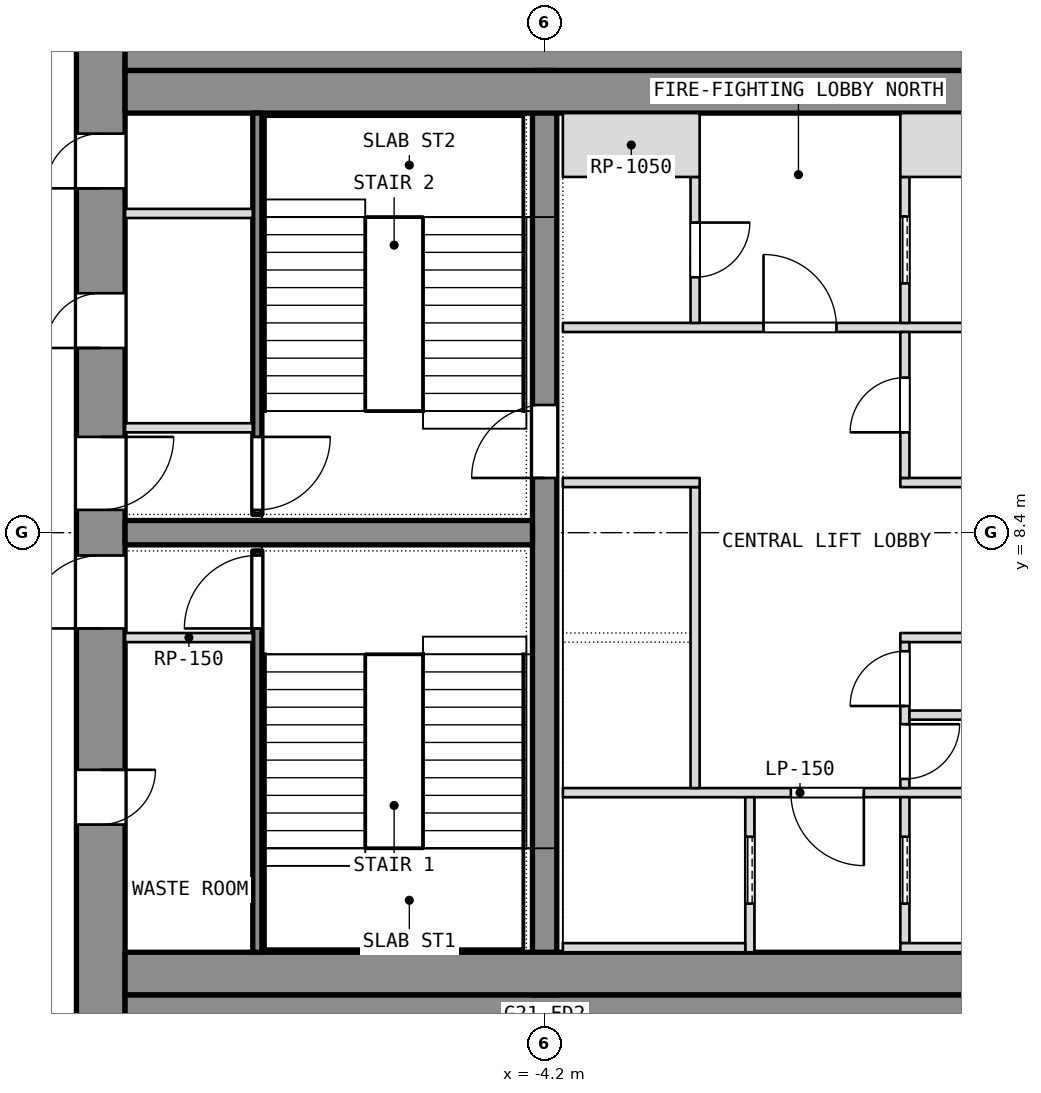
"""IFC4 building model, lengths in metres.
Left out: names, types, materials, properties, quantities, classifications, styles, units other than length and angle.
Written with IfcOpenShell. Run it as: python <this file> out.ifc"""

import sys

from ifc_helpers import new_model, si_unit, direction, frame, frame_2d, origin, place, context, subcontext, project, spatial, rectangle, extrude, element, fill, save


model = new_model("IFC4")
c1 = context("Model", 3, precision=1e-05, world=origin(), true_north=direction((0.0, 1.0)))
c2 = subcontext(c1, "Body", "Model", "MODEL_VIEW")
j1 = project(units=[si_unit("LENGTHUNIT", "METRE"), si_unit("PLANEANGLEUNIT", "RADIAN")], contexts=[c1])
p1 = place(None, origin())
s1 = spatial("IfcSite", under=j1, at=p1, CompositionType="ELEMENT")
p2 = place(p1, origin())
s2 = spatial("IfcBuilding", under=s1, at=p2, CompositionType="ELEMENT")
p3 = place(p2, frame((0.0, 0.0, 245.3)))
s3 = spatial("IfcBuildingStorey", under=s2, at=p3, CompositionType="ELEMENT", Elevation=245.3)
p4 = place(p3, frame((-11.5, 0.0, 0.0), z_axis=(0.0, 0.0, 1.0), x_axis=(0.0, 1.0, 0.0)))
e1 = element("IfcWall", 1, at=p4, inside=s3, PredefinedType="SHEAR", context=c2, shape_type="SweptSolid", body=[
    extrude(rectangle(XDim=16.8, YDim=0.8, at=frame_2d((8.4, 0.0))), origin(), (0.0, 0.0, 1.0), 3.6),
])
p5 = place(p4, frame((3.6, 0.0, 0.0)))
e2 = element("IfcOpeningElement", 2, at=p5, cuts=e1, PredefinedType="OPENING", context=c2, shape_type="SweptSolid", body=[
    extrude(rectangle(XDim=0.9, YDim=2.1, at=frame_2d((0.45, 1.05))), frame((0.0, 0.4, 0.0), z_axis=(0.0, -1.0, 0.0), x_axis=(1.0, 0.0, 0.0)), (0.0, 0.0, 1.0), 0.8),
])
p6 = place(p4, frame((6.825, 0.0, 0.0)))
e3 = element("IfcOpeningElement", 3, at=p6, cuts=e1, PredefinedType="OPENING", context=c2, shape_type="SweptSolid", body=[
    extrude(rectangle(XDim=1.2, YDim=2.1, at=frame_2d((0.6, 1.05))), frame((0.0, 0.4, 0.0), z_axis=(0.0, -1.0, 0.0), x_axis=(1.0, 0.0, 0.0)), (0.0, 0.0, 1.0), 0.8),
])
p7 = place(p4, frame((14.062, 0.0, 0.0)))
e4 = element("IfcOpeningElement", 4, at=p7, cuts=e1, PredefinedType="OPENING", context=c2, shape_type="SweptSolid", body=[
    extrude(rectangle(XDim=0.9, YDim=2.1, at=frame_2d((0.45, 1.05))), frame((0.0, 0.4, 0.0), z_axis=(0.0, -1.0, 0.0), x_axis=(1.0, 0.0, 0.0)), (0.0, 0.0, 1.0), 0.8),
])
p8 = place(p4, frame((11.438, 0.0, 0.0)))
e5 = element("IfcOpeningElement", 5, at=p8, cuts=e1, PredefinedType="OPENING", context=c2, shape_type="SweptSolid", body=[
    extrude(rectangle(XDim=0.9, YDim=2.1, at=frame_2d((0.45, 1.05))), frame((0.0, 0.4, 0.0), z_axis=(0.0, -1.0, 0.0), x_axis=(1.0, 0.0, 0.0)), (0.0, 0.0, 1.0), 0.8),
])
p9 = place(p4, frame((8.775, 0.0, 0.0)))
e6 = element("IfcOpeningElement", 6, at=p9, cuts=e1, PredefinedType="OPENING", context=c2, shape_type="SweptSolid", body=[
    extrude(rectangle(XDim=1.2, YDim=2.1, at=frame_2d((0.6, 1.05))), frame((0.0, 0.4, 0.0), z_axis=(0.0, -1.0, 0.0), x_axis=(1.0, 0.0, 0.0)), (0.0, 0.0, 1.0), 0.8),
])
for number, where, z_axis, x_axis in (
    (7, (-11.1, 0.4, 0.0), (0.0, 0.0, 1.0), (1.0, 0.0, 0.0)),
    (8, (-11.1, 16.4, 0.0), (0.0, 0.0, 1.0), (1.0, 0.0, 0.0)),
):
    element("IfcWall", number, at=place(p3, frame(where, z_axis=z_axis, x_axis=x_axis)), inside=s3, PredefinedType="SHEAR", context=c2, shape_type="SweptSolid", body=[
        extrude(rectangle(XDim=22.2, YDim=0.8, at=frame_2d((11.1, 0.0))), origin(), (0.0, 0.0, 1.0), 3.6),
    ])
p10 = place(p3, frame((-4.2, 0.8, 0.0), z_axis=(0.0, 0.0, 1.0), x_axis=(0.0, 1.0, 0.0)))
e9 = element("IfcWall", 9, at=p10, inside=s3, PredefinedType="SHEAR", context=c2, shape_type="SweptSolid", body=[
    extrude(rectangle(XDim=15.2, YDim=0.4, at=frame_2d((7.6, 0.0))), origin(), (0.0, 0.0, 1.0), 3.6),
])
p11 = place(p10, frame((8.5, 0.0, 0.0)))
e10 = element("IfcOpeningElement", 10, at=p11, cuts=e9, PredefinedType="OPENING", context=c2, shape_type="SweptSolid", body=[
    extrude(rectangle(XDim=1.2, YDim=2.1, at=frame_2d((0.6, 1.05))), frame((0.0, 0.2, 0.0), z_axis=(0.0, -1.0, 0.0), x_axis=(1.0, 0.0, 0.0)), (0.0, 0.0, 1.0), 0.4),
])
p12 = place(p3, frame((-11.1, 8.4, 0.0), z_axis=(0.0, 0.0, 1.0), x_axis=(1.0, 0.0, 0.0)))
e11 = element("IfcWall", 11, at=p12, inside=s3, PredefinedType="SHEAR", context=c2, shape_type="SweptSolid", body=[
    extrude(rectangle(XDim=6.7, YDim=0.4, at=frame_2d((3.35, 0.0))), origin(), (0.0, 0.0, 1.0), 3.6),
])
for number, where, z_axis, x_axis in (
    (12, (-11.1, 1.15, 0.0), (0.0, 0.0, 1.0), (1.0, 0.0, 0.0)),
    (13, (-11.1, 15.65, 0.0), (0.0, 0.0, 1.0), (1.0, 0.0, 0.0)),
):
    element("IfcWall", number, at=place(p3, frame(where, z_axis=z_axis, x_axis=x_axis)), inside=s3, PredefinedType="PARTITIONING", context=c2, shape_type="SweptSolid", body=[
        extrude(rectangle(XDim=22.2, YDim=0.7, at=frame_2d((11.1, 0.0))), origin(), (0.0, 0.0, 1.0), 3.34),
    ])
p13 = place(p3, frame((-8.925, 1.5, 0.0), z_axis=(0.0, 0.0, 1.0), x_axis=(0.0, 1.0, 0.0)))
e14 = element("IfcWall", 14, at=p13, inside=s3, PredefinedType="SHEAR", context=c2, shape_type="SweptSolid", body=[
    extrude(rectangle(XDim=6.6, YDim=0.15, at=frame_2d((3.3, 0.0))), origin(), (0.0, 0.0, 1.0), 3.34),
])
p14 = place(p13, frame((5.325, 0.0, 0.0)))
e15 = element("IfcOpeningElement", 15, at=p14, cuts=e14, PredefinedType="OPENING", context=c2, shape_type="SweptSolid", body=[
    extrude(rectangle(XDim=1.2, YDim=2.1, at=frame_2d((0.6, 1.05))), frame((0.0, 0.075, 0.0), z_axis=(0.0, -1.0, 0.0), x_axis=(1.0, 0.0, 0.0)), (0.0, 0.0, 1.0), 0.15),
])
p15 = place(p3, frame((-11.1, 6.675, 0.0), z_axis=(0.0, 0.0, 1.0), x_axis=(1.0, 0.0, 0.0)))
e16 = element("IfcWall", 16, at=p15, inside=s3, PredefinedType="PARTITIONING", context=c2, shape_type="SweptSolid", body=[
    extrude(rectangle(XDim=2.1, YDim=0.15, at=frame_2d((1.05, 0.0))), origin(), (0.0, 0.0, 1.0), 3.34),
])
p16 = place(p3, frame((-8.925, 8.7, 0.0), z_axis=(0.0, 0.0, 1.0), x_axis=(0.0, 1.0, 0.0)))
e17 = element("IfcWall", 17, at=p16, inside=s3, PredefinedType="SHEAR", context=c2, shape_type="SweptSolid", body=[
    extrude(rectangle(XDim=6.6, YDim=0.15, at=frame_2d((3.3, 0.0))), origin(), (0.0, 0.0, 1.0), 3.34),
])
p17 = place(p16, frame((0.075, 0.0, 0.0)))
e18 = element("IfcOpeningElement", 18, at=p17, cuts=e17, PredefinedType="OPENING", context=c2, shape_type="SweptSolid", body=[
    extrude(rectangle(XDim=1.2, YDim=2.1, at=frame_2d((0.6, 1.05))), frame((0.0, 0.075, 0.0), z_axis=(0.0, -1.0, 0.0), x_axis=(1.0, 0.0, 0.0)), (0.0, 0.0, 1.0), 0.15),
])
for number, where, z_axis, x_axis in (
    (19, (-11.1, 10.125, 0.0), (0.0, 0.0, 1.0), (1.0, 0.0, 0.0)),
    (20, (-11.1, 13.65, 0.0), (0.0, 0.0, 1.0), (1.0, 0.0, 0.0)),
):
    element("IfcWall", number, at=place(p3, frame(where, z_axis=z_axis, x_axis=x_axis)), inside=s3, PredefinedType="PARTITIONING", context=c2, shape_type="SweptSolid", body=[
        extrude(rectangle(XDim=2.1, YDim=0.15, at=frame_2d((1.05, 0.0))), origin(), (0.0, 0.0, 1.0), 3.34),
    ])
p18 = place(p3, frame((-3.9, 4.125, 0.0), z_axis=(0.0, 0.0, 1.0), x_axis=(1.0, 0.0, 0.0)))
e21 = element("IfcWall", 21, at=p18, inside=s3, PredefinedType="PARTITIONING", context=c2, shape_type="SweptSolid", body=[
    extrude(rectangle(XDim=7.8, YDim=0.15, at=frame_2d((3.9, 0.0))), origin(), (0.0, 0.0, 1.0), 3.34),
])
p19 = place(p18, frame((3.75, 0.0, 0.0)))
e22 = element("IfcOpeningElement", 22, at=p19, cuts=e21, PredefinedType="OPENING", context=c2, shape_type="SweptSolid", body=[
    extrude(rectangle(XDim=1.2, YDim=2.1, at=frame_2d((0.6, 1.05))), frame((0.0, 0.075, 0.0), z_axis=(0.0, -1.0, 0.0), x_axis=(1.0, 0.0, 0.0)), (0.0, 0.0, 1.0), 0.15),
])
p20 = place(p3, frame((-3.9, 11.775, 0.0), z_axis=(0.0, 0.0, 1.0), x_axis=(1.0, 0.0, 0.0)))
e23 = element("IfcWall", 23, at=p20, inside=s3, PredefinedType="PARTITIONING", context=c2, shape_type="SweptSolid", body=[
    extrude(rectangle(XDim=7.8, YDim=0.15, at=frame_2d((3.9, 0.0))), origin(), (0.0, 0.0, 1.0), 3.34),
])
p21 = place(p20, frame((3.3, 0.0, 0.0)))
e24 = element("IfcOpeningElement", 24, at=p21, cuts=e23, PredefinedType="OPENING", context=c2, shape_type="SweptSolid", body=[
    extrude(rectangle(XDim=1.2, YDim=2.1, at=frame_2d((0.6, 1.05))), frame((0.0, 0.075, 0.0), z_axis=(0.0, -1.0, 0.0), x_axis=(1.0, 0.0, 0.0)), (0.0, 0.0, 1.0), 0.15),
])
p22 = place(p3, frame((-0.825, 1.5, 0.0), z_axis=(0.0, 0.0, 1.0), x_axis=(0.0, 1.0, 0.0)))
e25 = element("IfcWall", 25, at=p22, inside=s3, PredefinedType="SHEAR", context=c2, shape_type="SweptSolid", body=[
    extrude(rectangle(XDim=2.55, YDim=0.15, at=frame_2d((1.275, 0.0))), origin(), (0.0, 0.0, 1.0), 3.6),
])
p23 = place(p22, frame((0.8, 0.0, 0.0)))
e26 = element("IfcOpeningElement", 26, at=p23, cuts=e25, PredefinedType="OPENING", context=c2, shape_type="SweptSolid", body=[
    extrude(rectangle(XDim=1.1, YDim=2.1, at=frame_2d((0.55, 1.05))), frame((0.0, 0.075, 0.0), z_axis=(0.0, -1.0, 0.0), x_axis=(1.0, 0.0, 0.0)), (0.0, 0.0, 1.0), 0.15),
])
p24 = place(p3, frame((-3.9, 1.575, 0.0), z_axis=(0.0, 0.0, 1.0), x_axis=(1.0, 0.0, 0.0)))
e27 = element("IfcWall", 27, at=p24, inside=s3, PredefinedType="SHEAR", context=c2, shape_type="SweptSolid", body=[
    extrude(rectangle(XDim=3.0, YDim=0.15, at=frame_2d((1.5, 0.0))), origin(), (0.0, 0.0, 1.0), 3.6),
])
p25 = place(p3, frame((-1.725, 4.2, 0.0), z_axis=(0.0, 0.0, 1.0), x_axis=(0.0, 1.0, 0.0)))
e28 = element("IfcWall", 28, at=p25, inside=s3, PredefinedType="SHEAR", context=c2, shape_type="SweptSolid", body=[
    extrude(rectangle(XDim=4.95, YDim=0.15, at=frame_2d((2.475, 0.0))), origin(), (0.0, 0.0, 1.0), 3.6),
])
p26 = place(p3, frame((-3.9, 9.225, 0.0), z_axis=(0.0, 0.0, 1.0), x_axis=(1.0, 0.0, 0.0)))
e29 = element("IfcWall", 29, at=p26, inside=s3, PredefinedType="SHEAR", context=c2, shape_type="SweptSolid", body=[
    extrude(rectangle(XDim=2.25, YDim=0.15, at=frame_2d((1.125, 0.0))), origin(), (0.0, 0.0, 1.0), 3.6),
])
p27 = place(p3, frame((-1.725, 11.85, 0.0), z_axis=(0.0, 0.0, 1.0), x_axis=(0.0, 1.0, 0.0)))
e30 = element("IfcWall", 30, at=p27, inside=s3, PredefinedType="PARTITIONING", context=c2, shape_type="SweptSolid", body=[
    extrude(rectangle(XDim=2.4, YDim=0.15, at=frame_2d((1.2, 0.0))), origin(), (0.0, 0.0, 1.0), 3.34),
])
p28 = place(p27, frame((0.75, 0.0, 0.0)))
e31 = element("IfcOpeningElement", 31, at=p28, cuts=e30, PredefinedType="OPENING", context=c2, shape_type="SweptSolid", body=[
    extrude(rectangle(XDim=0.9, YDim=2.1, at=frame_2d((0.45, 1.05))), frame((0.0, 0.075, 0.0), z_axis=(0.0, -1.0, 0.0), x_axis=(1.0, 0.0, 0.0)), (0.0, 0.0, 1.0), 0.15),
])
p29 = place(p3, frame((-3.9, 14.775, 0.0), z_axis=(0.0, 0.0, 1.0), x_axis=(1.0, 0.0, 0.0)))
e32 = element("IfcWall", 32, at=p29, inside=s3, PredefinedType="PARTITIONING", context=c2, shape_type="SweptSolid", body=[
    extrude(rectangle(XDim=2.25, YDim=1.05, at=frame_2d((1.125, 0.0))), origin(), (0.0, 0.0, 1.0), 3.34),
])
p30 = place(p3, frame((1.725, 1.65, 0.0), z_axis=(0.0, 0.0, 1.0), x_axis=(0.0, 1.0, 0.0)))
e33 = element("IfcWall", 33, at=p30, inside=s3, PredefinedType="SHEAR", context=c2, shape_type="SweptSolid", body=[
    extrude(rectangle(XDim=2.4, YDim=0.15, at=frame_2d((1.2, 0.0))), origin(), (0.0, 0.0, 1.0), 3.6),
])
p31 = place(p30, frame((0.65, 0.0, 0.0)))
e34 = element("IfcOpeningElement", 34, at=p31, cuts=e33, PredefinedType="OPENING", context=c2, shape_type="SweptSolid", body=[
    extrude(rectangle(XDim=1.1, YDim=2.1, at=frame_2d((0.55, 1.05))), frame((0.0, 0.075, 0.0), z_axis=(0.0, -1.0, 0.0), x_axis=(1.0, 0.0, 0.0)), (0.0, 0.0, 1.0), 0.15),
])
p32 = place(p3, frame((1.65, 1.575, 0.0), z_axis=(0.0, 0.0, 1.0), x_axis=(1.0, 0.0, 0.0)))
e35 = element("IfcWall", 35, at=p32, inside=s3, PredefinedType="SHEAR", context=c2, shape_type="SweptSolid", body=[
    extrude(rectangle(XDim=2.25, YDim=0.15, at=frame_2d((1.125, 0.0))), origin(), (0.0, 0.0, 1.0), 3.6),
])
p33 = place(p3, frame((1.725, 11.85, 0.0), z_axis=(0.0, 0.0, 1.0), x_axis=(0.0, 1.0, 0.0)))
e36 = element("IfcWall", 36, at=p33, inside=s3, PredefinedType="SHEAR", context=c2, shape_type="SweptSolid", body=[
    extrude(rectangle(XDim=2.4, YDim=0.15, at=frame_2d((1.2, 0.0))), origin(), (0.0, 0.0, 1.0), 3.6),
])
p34 = place(p33, frame((0.65, 0.0, 0.0)))
e37 = element("IfcOpeningElement", 37, at=p34, cuts=e36, PredefinedType="OPENING", context=c2, shape_type="SweptSolid", body=[
    extrude(rectangle(XDim=1.1, YDim=2.1, at=frame_2d((0.55, 1.05))), frame((0.0, 0.075, 0.0), z_axis=(0.0, -1.0, 0.0), x_axis=(1.0, 0.0, 0.0)), (0.0, 0.0, 1.0), 0.15),
])
p35 = place(p3, frame((1.65, 14.775, 0.0), z_axis=(0.0, 0.0, 1.0), x_axis=(1.0, 0.0, 0.0)))
e38 = element("IfcWall", 38, at=p35, inside=s3, PredefinedType="SHEAR", context=c2, shape_type="SweptSolid", body=[
    extrude(rectangle(XDim=2.25, YDim=1.05, at=frame_2d((1.125, 0.0))), origin(), (0.0, 0.0, 1.0), 3.6),
])
for number, where, z_axis, x_axis in (
    (39, (1.65, 6.675, 0.0), (0.0, 0.0, 1.0), (1.0, 0.0, 0.0)),
    (40, (1.65, 9.225, 0.0), (0.0, 0.0, 1.0), (1.0, 0.0, 0.0)),
):
    element("IfcWall", number, at=place(p3, frame(where, z_axis=z_axis, x_axis=x_axis)), inside=s3, PredefinedType="PARTITIONING", context=c2, shape_type="SweptSolid", body=[
        extrude(rectangle(XDim=2.25, YDim=0.15, at=frame_2d((1.125, 0.0))), origin(), (0.0, 0.0, 1.0), 3.34),
    ])
p36 = place(p3, frame((1.725, 4.2, 0.0), z_axis=(0.0, 0.0, 1.0), x_axis=(0.0, 1.0, 0.0)))
e41 = element("IfcWall", 41, at=p36, inside=s3, PredefinedType="PARTITIONING", context=c2, shape_type="SweptSolid", body=[
    extrude(rectangle(XDim=2.4, YDim=0.15, at=frame_2d((1.2, 0.0))), origin(), (0.0, 0.0, 1.0), 3.34),
])
p37 = place(p36, frame((0.15, 0.0, 0.0)))
e42 = element("IfcOpeningElement", 42, at=p37, cuts=e41, PredefinedType="OPENING", context=c2, shape_type="SweptSolid", body=[
    extrude(rectangle(XDim=0.9, YDim=2.1, at=frame_2d((0.45, 1.05))), frame((0.0, 0.075, 0.0), z_axis=(0.0, -1.0, 0.0), x_axis=(1.0, 0.0, 0.0)), (0.0, 0.0, 1.0), 0.15),
])
p38 = place(p36, frame((1.35, 0.0, 0.0)))
e43 = element("IfcOpeningElement", 43, at=p38, cuts=e41, PredefinedType="OPENING", context=c2, shape_type="SweptSolid", body=[
    extrude(rectangle(XDim=0.9, YDim=2.1, at=frame_2d((0.45, 1.05))), frame((0.0, 0.075, 0.0), z_axis=(0.0, -1.0, 0.0), x_axis=(1.0, 0.0, 0.0)), (0.0, 0.0, 1.0), 0.15),
])
p39 = place(p3, frame((1.725, 9.3, 0.0), z_axis=(0.0, 0.0, 1.0), x_axis=(0.0, 1.0, 0.0)))
e44 = element("IfcWall", 44, at=p39, inside=s3, PredefinedType="PARTITIONING", context=c2, shape_type="SweptSolid", body=[
    extrude(rectangle(XDim=2.4, YDim=0.15, at=frame_2d((1.2, 0.0))), origin(), (0.0, 0.0, 1.0), 3.34),
])
p40 = place(p39, frame((0.75, 0.0, 0.0)))
e45 = element("IfcOpeningElement", 45, at=p40, cuts=e44, PredefinedType="OPENING", context=c2, shape_type="SweptSolid", body=[
    extrude(rectangle(XDim=0.9, YDim=2.1, at=frame_2d((0.45, 1.05))), frame((0.0, 0.075, 0.0), z_axis=(0.0, -1.0, 0.0), x_axis=(1.0, 0.0, 0.0)), (0.0, 0.0, 1.0), 0.15),
])
p41 = place(p3, frame((1.8, 5.4, 0.0), z_axis=(0.0, 0.0, 1.0), x_axis=(1.0, 0.0, 0.0)))
e46 = element("IfcWall", 46, at=p41, inside=s3, PredefinedType="PARTITIONING", context=c2, shape_type="SweptSolid", body=[
    extrude(rectangle(XDim=2.1, YDim=0.15, at=frame_2d((1.05, 0.0))), origin(), (0.0, 0.0, 1.0), 3.34),
])
p42 = place(p5, origin())
e47 = element("IfcDoor", 47, at=p42, inside=s3, OperationType="SINGLE_SWING_LEFT", PredefinedType="DOOR", context=c2, shape_type="SweptSolid", body=[
    extrude(rectangle(XDim=0.9, YDim=2.1, at=frame_2d((0.45, 1.05))), frame((0.0, 0.025, 0.0), z_axis=(0.0, -1.0, 0.0), x_axis=(1.0, 0.0, 0.0)), (0.0, 0.0, 1.0), 0.05),
])
fill(e2, e47)
p43 = place(p6, origin())
e48 = element("IfcDoor", 48, at=p43, inside=s3, OperationType="SINGLE_SWING_LEFT", PredefinedType="DOOR", context=c2, shape_type="SweptSolid", body=[
    extrude(rectangle(XDim=1.2, YDim=2.1, at=frame_2d((0.6, 1.05))), frame((0.0, 0.025, 0.0), z_axis=(0.0, -1.0, 0.0), x_axis=(1.0, 0.0, 0.0)), (0.0, 0.0, 1.0), 0.05),
])
fill(e3, e48)
p44 = place(p14, origin())
e49 = element("IfcDoor", 49, at=p44, inside=s3, OperationType="SINGLE_SWING_LEFT", PredefinedType="DOOR", context=c2, shape_type="SweptSolid", body=[
    extrude(rectangle(XDim=1.2, YDim=2.1, at=frame_2d((0.6, 1.05))), frame((0.0, 0.025, 0.0), z_axis=(0.0, -1.0, 0.0), x_axis=(1.0, 0.0, 0.0)), (0.0, 0.0, 1.0), 0.05),
])
fill(e15, e49)
p45 = place(p7, origin())
e50 = element("IfcDoor", 50, at=p45, inside=s3, OperationType="SINGLE_SWING_LEFT", PredefinedType="DOOR", context=c2, shape_type="SweptSolid", body=[
    extrude(rectangle(XDim=0.9, YDim=2.1, at=frame_2d((0.45, 1.05))), frame((0.0, 0.025, 0.0), z_axis=(0.0, -1.0, 0.0), x_axis=(1.0, 0.0, 0.0)), (0.0, 0.0, 1.0), 0.05),
])
fill(e4, e50)
p46 = place(p8, origin())
e51 = element("IfcDoor", 51, at=p46, inside=s3, OperationType="SINGLE_SWING_LEFT", PredefinedType="DOOR", context=c2, shape_type="SweptSolid", body=[
    extrude(rectangle(XDim=0.9, YDim=2.1, at=frame_2d((0.45, 1.05))), frame((0.0, 0.025, 0.0), z_axis=(0.0, -1.0, 0.0), x_axis=(1.0, 0.0, 0.0)), (0.0, 0.0, 1.0), 0.05),
])
fill(e5, e51)
p47 = place(p9, origin())
e52 = element("IfcDoor", 52, at=p47, inside=s3, OperationType="SINGLE_SWING_LEFT", PredefinedType="DOOR", context=c2, shape_type="SweptSolid", body=[
    extrude(rectangle(XDim=1.2, YDim=2.1, at=frame_2d((0.6, 1.05))), frame((0.0, 0.025, 0.0), z_axis=(0.0, -1.0, 0.0), x_axis=(1.0, 0.0, 0.0)), (0.0, 0.0, 1.0), 0.05),
])
fill(e6, e52)
p48 = place(p17, origin())
e53 = element("IfcDoor", 53, at=p48, inside=s3, OperationType="SINGLE_SWING_LEFT", PredefinedType="DOOR", context=c2, shape_type="SweptSolid", body=[
    extrude(rectangle(XDim=1.2, YDim=2.1, at=frame_2d((0.6, 1.05))), frame((0.0, 0.025, 0.0), z_axis=(0.0, -1.0, 0.0), x_axis=(1.0, 0.0, 0.0)), (0.0, 0.0, 1.0), 0.05),
])
fill(e18, e53)
p49 = place(p37, origin())
e54 = element("IfcDoor", 54, at=p49, inside=s3, OperationType="SINGLE_SWING_LEFT", PredefinedType="DOOR", context=c2, shape_type="SweptSolid", body=[
    extrude(rectangle(XDim=0.9, YDim=2.1, at=frame_2d((0.45, 1.05))), frame((0.0, 0.025, 0.0), z_axis=(0.0, -1.0, 0.0), x_axis=(1.0, 0.0, 0.0)), (0.0, 0.0, 1.0), 0.05),
])
fill(e42, e54)
p50 = place(p38, origin())
e55 = element("IfcDoor", 55, at=p50, inside=s3, OperationType="SINGLE_SWING_LEFT", PredefinedType="DOOR", context=c2, shape_type="SweptSolid", body=[
    extrude(rectangle(XDim=0.9, YDim=2.1, at=frame_2d((0.45, 1.05))), frame((0.0, 0.025, 0.0), z_axis=(0.0, -1.0, 0.0), x_axis=(1.0, 0.0, 0.0)), (0.0, 0.0, 1.0), 0.05),
])
fill(e43, e55)
p51 = place(p40, origin())
e56 = element("IfcDoor", 56, at=p51, inside=s3, OperationType="SINGLE_SWING_LEFT", PredefinedType="DOOR", context=c2, shape_type="SweptSolid", body=[
    extrude(rectangle(XDim=0.9, YDim=2.1, at=frame_2d((0.45, 1.05))), frame((0.0, 0.025, 0.0), z_axis=(0.0, -1.0, 0.0), x_axis=(1.0, 0.0, 0.0)), (0.0, 0.0, 1.0), 0.05),
])
fill(e45, e56)
p52 = place(p23, origin())
e57 = element("IfcDoor", 57, at=p52, inside=s3, OperationType="SLIDING_TO_LEFT", PredefinedType="DOOR", context=c2, shape_type="SweptSolid", body=[
    extrude(rectangle(XDim=1.1, YDim=2.1, at=frame_2d((0.55, 1.05))), frame((0.0, 0.025, 0.0), z_axis=(0.0, -1.0, 0.0), x_axis=(1.0, 0.0, 0.0)), (0.0, 0.0, 1.0), 0.05),
])
fill(e26, e57)
p53 = place(p31, origin())
e58 = element("IfcDoor", 58, at=p53, inside=s3, OperationType="SLIDING_TO_LEFT", PredefinedType="DOOR", context=c2, shape_type="SweptSolid", body=[
    extrude(rectangle(XDim=1.1, YDim=2.1, at=frame_2d((0.55, 1.05))), frame((0.0, 0.025, 0.0), z_axis=(0.0, -1.0, 0.0), x_axis=(1.0, 0.0, 0.0)), (0.0, 0.0, 1.0), 0.05),
])
fill(e34, e58)
p54 = place(p34, origin())
e59 = element("IfcDoor", 59, at=p54, inside=s3, OperationType="SLIDING_TO_LEFT", PredefinedType="DOOR", context=c2, shape_type="SweptSolid", body=[
    extrude(rectangle(XDim=1.1, YDim=2.1, at=frame_2d((0.55, 1.05))), frame((0.0, 0.025, 0.0), z_axis=(0.0, -1.0, 0.0), x_axis=(1.0, 0.0, 0.0)), (0.0, 0.0, 1.0), 0.05),
])
fill(e37, e59)
p55 = place(p19, origin())
e60 = element("IfcDoor", 60, at=p55, inside=s3, OperationType="SINGLE_SWING_LEFT", PredefinedType="DOOR", context=c2, shape_type="SweptSolid", body=[
    extrude(rectangle(XDim=1.2, YDim=2.1, at=frame_2d((0.6, 1.05))), frame((0.0, 0.025, 0.0), z_axis=(0.0, -1.0, 0.0), x_axis=(1.0, 0.0, 0.0)), (0.0, 0.0, 1.0), 0.05),
])
fill(e22, e60)
p56 = place(p21, origin())
e61 = element("IfcDoor", 61, at=p56, inside=s3, OperationType="SINGLE_SWING_LEFT", PredefinedType="DOOR", context=c2, shape_type="SweptSolid", body=[
    extrude(rectangle(XDim=1.2, YDim=2.1, at=frame_2d((0.6, 1.05))), frame((0.0, 0.025, 0.0), z_axis=(0.0, -1.0, 0.0), x_axis=(1.0, 0.0, 0.0)), (0.0, 0.0, 1.0), 0.05),
])
fill(e24, e61)
p57 = place(p28, origin())
e62 = element("IfcDoor", 62, at=p57, inside=s3, OperationType="SINGLE_SWING_LEFT", PredefinedType="DOOR", context=c2, shape_type="SweptSolid", body=[
    extrude(rectangle(XDim=0.9, YDim=2.1, at=frame_2d((0.45, 1.05))), frame((0.0, 0.025, 0.0), z_axis=(0.0, -1.0, 0.0), x_axis=(1.0, 0.0, 0.0)), (0.0, 0.0, 1.0), 0.05),
])
fill(e31, e62)
p58 = place(p11, origin())
e63 = element("IfcDoor", 63, at=p58, inside=s3, OperationType="SINGLE_SWING_LEFT", PredefinedType="DOOR", context=c2, shape_type="SweptSolid", body=[
    extrude(rectangle(XDim=1.2, YDim=2.1, at=frame_2d((0.6, 1.05))), frame((0.0, 0.025, 0.0), z_axis=(0.0, -1.0, 0.0), x_axis=(1.0, 0.0, 0.0)), (0.0, 0.0, 1.0), 0.05),
])
fill(e10, e63)
save(model, sys.argv[1])
